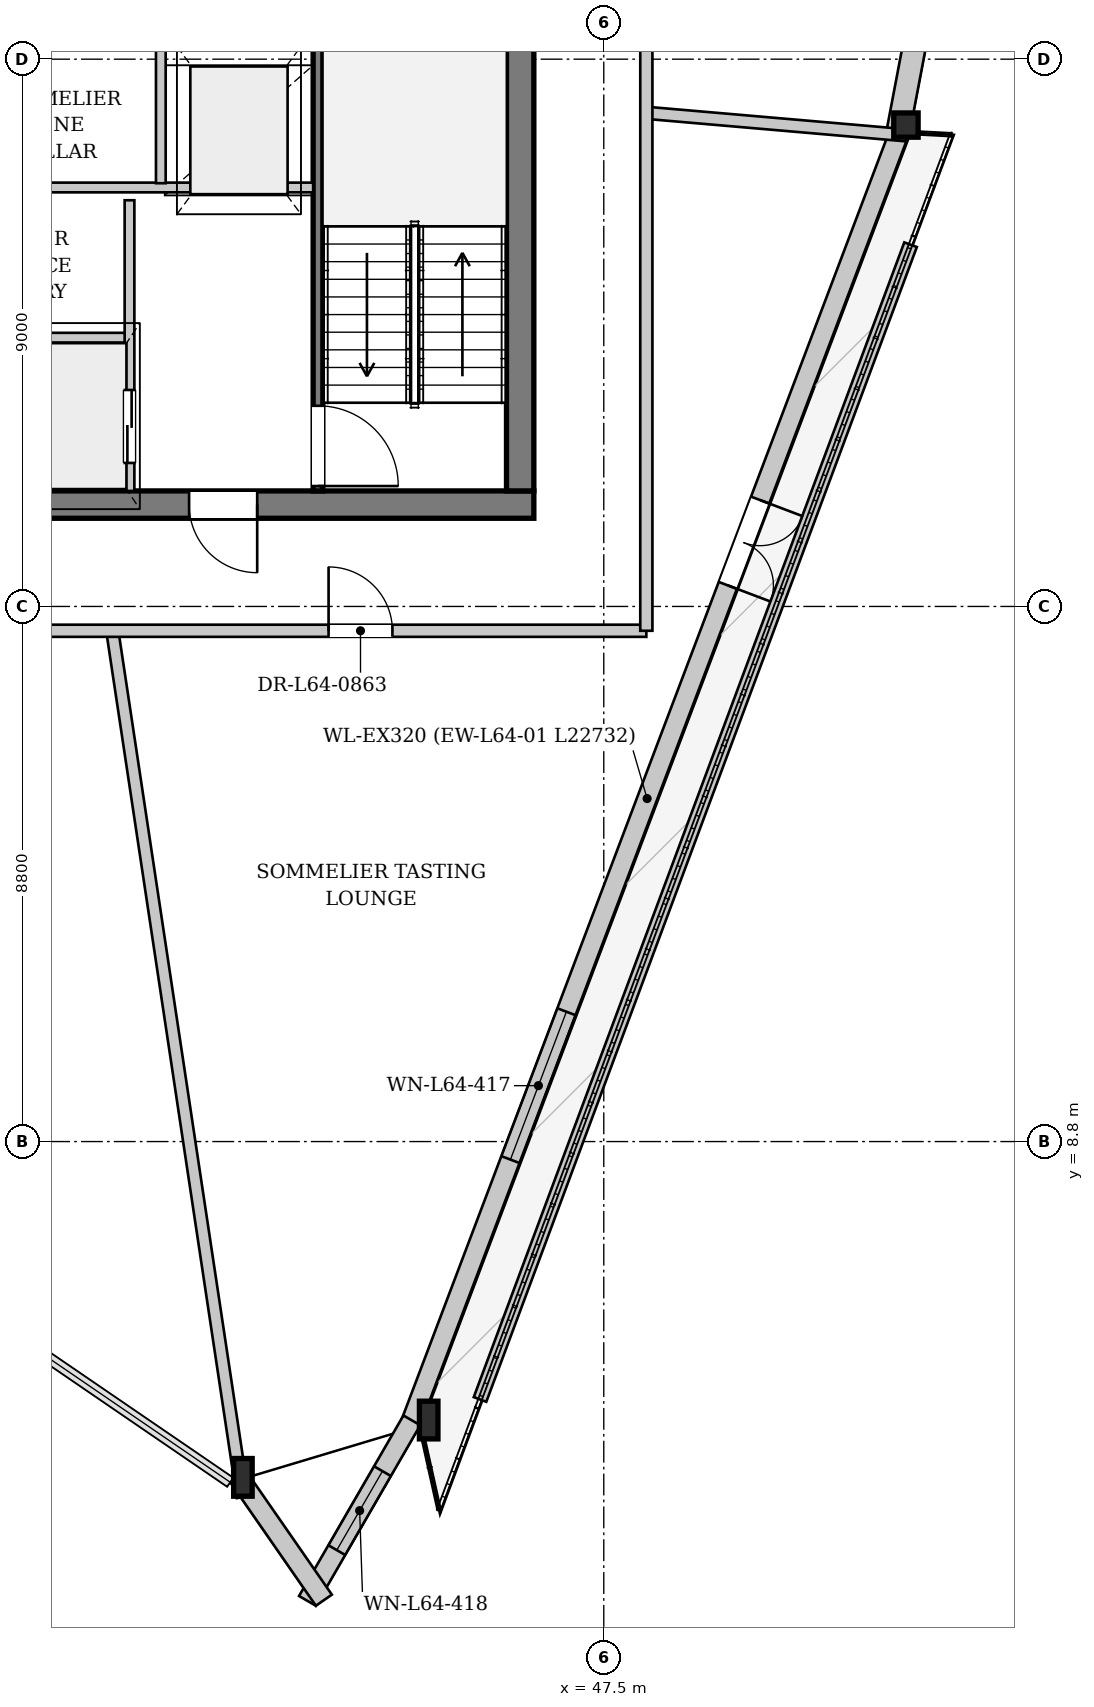
"""IFC4 building model, lengths in metres.
Left out: names, types, materials, properties, quantities, classifications, styles, units other than length and angle.
Written with IfcOpenShell. Run it as: python <this file> out.ifc"""

import sys

from ifc_helpers import new_model, si_unit, direction, frame, frame_2d, origin, origin_2d, place, context, subcontext, project, spatial, rectangle, i_section, extrude, source, transform, mapped, element, fill, save


model = new_model("IFC4")
c1 = context("Model", 3, precision=1e-05, world=origin(), true_north=direction((0.0, 1.0)))
c2 = subcontext(c1, "Body", "Model", "MODEL_VIEW")
j1 = project(units=[si_unit("LENGTHUNIT", "METRE"), si_unit("PLANEANGLEUNIT", "RADIAN")], contexts=[c1])
p1 = place(None, origin())
s1 = spatial("IfcSite", under=j1, at=p1, CompositionType="ELEMENT")
p2 = place(p1, origin())
s2 = spatial("IfcBuilding", under=s1, at=p2, CompositionType="ELEMENT")
p3 = place(p2, frame((0.0, 0.0, 241.7)))
s3 = spatial("IfcBuildingStorey", under=s2, at=p3, CompositionType="ELEMENT", Elevation=241.7)
m1 = source(origin(), c2, "Body", "SweptSolid", [
    extrude(i_section(OverallWidth=0.305, OverallDepth=0.62, WebThickness=0.021, FlangeThickness=0.04, at=origin_2d()), origin(), (0.0, 0.0, 1.0), 3.464),
])
p4 = place(p3, frame((41.357, 3.198, 0.0), z_axis=(0.120378309465, 0.046445729472, 0.991640991904), x_axis=(-0.359967164557, 0.932964972783, 0.0)))
e1 = element("IfcColumn", 1, at=p4, inside=s3, PredefinedType="COLUMN", context=c2, shape_type="MappedRepresentation", body=[
    mapped(m1, transform((0.0, 0.0, 0.0), x_axis=(1.0, 0.0, 0.0), y_axis=(0.0, 1.0, 0.0), z_axis=(0.0, 0.0, 1.0), scale=1.0)),
])
m2 = source(origin(), c2, "Body", "SweptSolid", [
    extrude(i_section(OverallWidth=0.305, OverallDepth=0.62, WebThickness=0.021, FlangeThickness=0.04, at=origin_2d()), origin(), (0.0, 0.0, 1.0), 3.45),
])
p5 = place(p3, frame((44.482, 4.135, 0.0), z_axis=(0.080168448244, 0.049318100994, 0.99556051791), x_axis=(-0.523971590103, 0.851735741157, 0.0)))
e2 = element("IfcColumn", 2, at=p5, inside=s3, PredefinedType="COLUMN", context=c2, shape_type="MappedRepresentation", body=[
    mapped(m2, transform((0.0, 0.0, 0.0), x_axis=(1.0, 0.0, 0.0), y_axis=(0.0, 1.0, 0.0), z_axis=(0.0, 0.0, 1.0), scale=1.0)),
])
m3 = source(origin(), c2, "Body", "SweptSolid", [
    extrude(i_section(OverallWidth=0.401, OverallDepth=0.399, WebThickness=0.022, FlangeThickness=0.034, at=origin_2d()), origin(), (0.0, 0.0, 1.0), 3.446),
])
p6 = place(p3, frame((52.531, 25.394, 0.0), z_axis=(-0.035848953239, 0.071060276874, 0.996827612781), x_axis=(-0.892819182684, -0.450415260656, 0.0)))
e3 = element("IfcColumn", 3, at=p6, inside=s3, PredefinedType="COLUMN", context=c2, shape_type="MappedRepresentation", body=[
    mapped(m3, transform((0.0, 0.0, 0.0), x_axis=(1.0, 0.0, 0.0), y_axis=(0.0, 1.0, 0.0), z_axis=(0.0, 0.0, 1.0), scale=1.0)),
])
p7 = place(p3, frame((52.382, 25.451, 0.0), z_axis=(0.0, 0.0, 1.0), x_axis=(-0.354101826289, -0.935206873702, 0.0)))
e4 = element("IfcWall", 4, at=p7, inside=s3, PredefinedType="SOLIDWALL", context=c2, shape_type="SweptSolid", body=[
    extrude(rectangle(XDim=22.732, YDim=0.32, at=frame_2d((11.366, 0.0))), origin(), (0.0, 0.0, 1.0), 2.872),
])
p8 = place(p7, frame((6.524, 0.0, 0.0)))
e5 = element("IfcOpeningElement", 5, at=p8, cuts=e4, PredefinedType="OPENING", context=c2, shape_type="SweptSolid", body=[
    extrude(rectangle(XDim=1.5, YDim=2.3, at=frame_2d((0.75, 1.15))), frame((0.0, 0.17, 0.0), z_axis=(0.0, -1.0, 0.0), x_axis=(1.0, 0.0, 0.0)), (0.0, 0.0, 1.0), 0.34),
])
p9 = place(p7, frame((15.521, 0.0, 0.402)))
e6 = element("IfcOpeningElement", 6, at=p9, cuts=e4, PredefinedType="OPENING", context=c2, shape_type="SweptSolid", body=[
    extrude(rectangle(XDim=2.6, YDim=2.35, at=frame_2d((1.3, 1.175))), frame((0.0, 0.17, 0.0), z_axis=(0.0, -1.0, 0.0), x_axis=(1.0, 0.0, 0.0)), (0.0, 0.0, 1.0), 0.34),
])
p10 = place(p3, frame((44.344, 4.215, 0.0), z_axis=(0.0, 0.0, 1.0), x_axis=(-0.500640512014, -0.865655288051, 0.0)))
e7 = element("IfcWall", 7, at=p10, inside=s3, PredefinedType="SOLIDWALL", context=c2, shape_type="SweptSolid", body=[
    extrude(rectangle(XDim=3.429, YDim=0.32, at=frame_2d((1.715, 0.0))), origin(), (0.0, 0.0, 1.0), 2.872),
])
p11 = place(p10, frame((0.965, 0.0, 0.452)))
e8 = element("IfcOpeningElement", 8, at=p11, cuts=e7, PredefinedType="OPENING", context=c2, shape_type="SweptSolid", body=[
    extrude(rectangle(XDim=1.5, YDim=2.3, at=frame_2d((0.75, 1.15))), frame((0.0, 0.17, 0.0), z_axis=(0.0, -1.0, 0.0), x_axis=(1.0, 0.0, 0.0)), (0.0, 0.0, 1.0), 0.34),
])
p12 = place(p3, frame((42.896, 1.258, 0.0), z_axis=(0.0, 0.0, 1.0), x_axis=(-0.569903262384, 0.821711793467, 0.0)))
e9 = element("IfcWall", 9, at=p12, inside=s3, PredefinedType="SOLIDWALL", context=c2, shape_type="SweptSolid", body=[
    extrude(rectangle(XDim=2.471, YDim=0.32, at=frame_2d((1.236, 0.0))), origin(), (0.0, 0.0, 1.0), 2.872),
])
p13 = place(p3, frame((56.589, 47.761, 0.0), z_axis=(0.0, 0.0, 1.0), x_axis=(-0.186738493237, -0.982409657497, 0.0)))
e10 = element("IfcWall", 10, at=p13, inside=s3, PredefinedType="SOLIDWALL", context=c2, shape_type="SweptSolid", body=[
    extrude(rectangle(XDim=22.732, YDim=0.38, at=frame_2d((11.366, 0.0))), origin(), (0.0, 0.0, 1.0), 2.872),
])
p14 = place(p13, frame((5.265, 0.0, 0.502)))
e11 = element("IfcOpeningElement", 11, at=p14, cuts=e10, PredefinedType="OPENING", context=c2, shape_type="SweptSolid", body=[
    extrude(rectangle(XDim=2.2, YDim=2.25, at=frame_2d((1.1, 1.125))), frame((0.0, 0.2, 0.0), z_axis=(0.0, -1.0, 0.0), x_axis=(1.0, 0.0, 0.0)), (0.0, 0.0, 1.0), 0.4),
])
p15 = place(p13, frame((15.267, 0.0, 0.502)))
e12 = element("IfcOpeningElement", 12, at=p15, cuts=e10, PredefinedType="OPENING", context=c2, shape_type="SweptSolid", body=[
    extrude(rectangle(XDim=2.2, YDim=2.25, at=frame_2d((1.1, 1.125))), frame((0.0, 0.2, 0.0), z_axis=(0.0, -1.0, 0.0), x_axis=(1.0, 0.0, 0.0)), (0.0, 0.0, 1.0), 0.4),
])
p16 = place(p3, frame((45.465, 4.559, 0.0), z_axis=(0.0, 0.0, 1.0), x_axis=(0.349367033566, 0.93698595286, 0.0)))
e13 = element("IfcWall", 13, at=p16, inside=s3, PredefinedType="PARAPET", context=c2, shape_type="SweptSolid", body=[
    extrude(rectangle(XDim=20.267, YDim=0.22, at=frame_2d((10.133, 0.0))), origin(), (0.0, 0.0, 1.0), 0.3),
])
p17 = place(p3, frame((46.35, 19.275, 0.0), z_axis=(0.0, 0.0, 1.0), x_axis=(-1.0, 0.0, 0.0)))
e14 = element("IfcWall", 14, at=p17, inside=s3, PredefinedType="SHEAR", context=c2, shape_type="SweptSolid", body=[
    extrude(rectangle(XDim=16.7, YDim=0.45, at=frame_2d((8.35, 0.0))), origin(), (0.0, 0.0, 1.0), 3.38),
])
p18 = place(p17, frame((4.55, 0.0, 0.0)))
e15 = element("IfcOpeningElement", 15, at=p18, cuts=e14, PredefinedType="OPENING", context=c2, shape_type="SweptSolid", body=[
    extrude(rectangle(XDim=1.12, YDim=2.25, at=frame_2d((0.56, 1.125))), frame((0.0, 0.235, 0.0), z_axis=(0.0, -1.0, 0.0), x_axis=(1.0, 0.0, 0.0)), (0.0, 0.0, 1.0), 0.47),
])
p19 = place(p17, frame((11.05, 0.0, 0.0)))
e16 = element("IfcOpeningElement", 16, at=p19, cuts=e14, PredefinedType="OPENING", context=c2, shape_type="SweptSolid", body=[
    extrude(rectangle(XDim=1.12, YDim=2.25, at=frame_2d((0.56, 1.125))), frame((0.0, 0.235, 0.0), z_axis=(0.0, -1.0, 0.0), x_axis=(1.0, 0.0, 0.0)), (0.0, 0.0, 1.0), 0.47),
])
p20 = place(p3, frame((46.125, 33.7, 0.0), z_axis=(0.0, 0.0, 1.0), x_axis=(0.0, -1.0, 0.0)))
e17 = element("IfcWall", 17, at=p20, inside=s3, PredefinedType="SHEAR", context=c2, shape_type="SweptSolid", body=[
    extrude(rectangle(XDim=14.2, YDim=0.45, at=frame_2d((7.1, 0.0))), origin(), (0.0, 0.0, 1.0), 3.38),
])
p21 = place(p20, frame((5.18, 0.0, 0.0)))
e18 = element("IfcOpeningElement", 18, at=p21, cuts=e17, PredefinedType="OPENING", context=c2, shape_type="SweptSolid", body=[
    extrude(rectangle(XDim=1.6, YDim=2.2, at=frame_2d((0.8, 1.1))), frame((0.0, 0.235, 0.0), z_axis=(0.0, -1.0, 0.0), x_axis=(1.0, 0.0, 0.0)), (0.0, 0.0, 1.0), 0.47),
])
p22 = place(p20, frame((2.05, 0.0, 0.0)))
e19 = element("IfcOpeningElement", 19, at=p22, cuts=e17, PredefinedType="OPENING", context=c2, shape_type="SweptSolid", body=[
    extrude(rectangle(XDim=0.95, YDim=2.1, at=frame_2d((0.475, 1.05))), frame((0.0, 0.235, 0.0), z_axis=(0.0, -1.0, 0.0), x_axis=(1.0, 0.0, 0.0)), (0.0, 0.0, 1.0), 0.47),
])
p23 = place(p3, frame((42.8, 26.96, 0.0), z_axis=(0.0, 0.0, 1.0), x_axis=(0.0, -1.0, 0.0)))
e20 = element("IfcWall", 20, at=p23, inside=s3, PredefinedType="PARTITIONING", context=c2, shape_type="SweptSolid", body=[
    extrude(rectangle(XDim=7.46, YDim=0.16, at=frame_2d((3.73, 0.0))), origin(), (0.0, 0.0, 1.0), 3.38),
])
p24 = place(p23, frame((6.06, 0.0, 0.0)))
e21 = element("IfcOpeningElement", 21, at=p24, cuts=e20, PredefinedType="OPENING", context=c2, shape_type="SweptSolid", body=[
    extrude(rectangle(XDim=1.32, YDim=2.2, at=frame_2d((0.66, 1.1))), frame((0.0, 0.09, 0.0), z_axis=(0.0, -1.0, 0.0), x_axis=(1.0, 0.0, 0.0)), (0.0, 0.0, 1.0), 0.18),
])
p25 = place(p3, frame((39.7, 24.28, 0.0), z_axis=(0.0, 0.0, 1.0), x_axis=(0.0, -1.0, 0.0)))
e22 = element("IfcWall", 22, at=p25, inside=s3, PredefinedType="PARTITIONING", context=c2, shape_type="SweptSolid", body=[
    extrude(rectangle(XDim=4.78, YDim=0.16, at=frame_2d((2.39, 0.0))), origin(), (0.0, 0.0, 1.0), 3.38),
])
p26 = place(p25, frame((3.12, 0.0, 0.0)))
e23 = element("IfcOpeningElement", 23, at=p26, cuts=e22, PredefinedType="OPENING", context=c2, shape_type="SweptSolid", body=[
    extrude(rectangle(XDim=1.2, YDim=2.2, at=frame_2d((0.6, 1.1))), frame((0.0, 0.09, 0.0), z_axis=(0.0, -1.0, 0.0), x_axis=(1.0, 0.0, 0.0)), (0.0, 0.0, 1.0), 0.18),
])
p27 = place(p3, frame((36.38, 22.02, 0.0), z_axis=(0.0, 0.0, 1.0), x_axis=(1.0, 0.0, 0.0)))
e24 = element("IfcWall", 24, at=p27, inside=s3, PredefinedType="PARTITIONING", context=c2, shape_type="SweptSolid", body=[
    extrude(rectangle(XDim=3.24, YDim=0.16, at=frame_2d((1.62, 0.0))), origin(), (0.0, 0.0, 1.0), 3.38),
])
p28 = place(p3, frame((33.28, 24.49, 0.0), z_axis=(0.0, 0.0, 1.0), x_axis=(1.0, 0.0, 0.0)))
e25 = element("IfcWall", 25, at=p28, inside=s3, PredefinedType="PARTITIONING", context=c2, shape_type="SweptSolid", body=[
    extrude(rectangle(XDim=9.44, YDim=0.16, at=frame_2d((4.72, 0.0))), origin(), (0.0, 0.0, 1.0), 3.38),
])
p29 = place(p3, frame((40.215, 24.56, 0.0), z_axis=(0.0, 0.0, 1.0), x_axis=(0.0, 1.0, 0.0)))
e26 = element("IfcWall", 26, at=p29, inside=s3, PredefinedType="PARTITIONING", context=c2, shape_type="SweptSolid", body=[
    extrude(rectangle(XDim=2.31, YDim=0.16, at=frame_2d((1.155, 0.0))), origin(), (0.0, 0.0, 1.0), 3.38),
])
p30 = place(p3, frame((39.417, 17.2, 0.0), z_axis=(0.0, 0.0, 1.0), x_axis=(0.149026402879, -0.988833217102, 0.0)))
e27 = element("IfcWall", 27, at=p30, inside=s3, PredefinedType="PARTITIONING", context=c2, shape_type="SweptSolid", body=[
    extrude(rectangle(XDim=14.41, YDim=0.2, at=frame_2d((7.205, 0.0))), origin(), (0.0, 0.0, 1.0), 3.38),
])
p31 = place(p3, frame((48.2, 25.718, 0.0), z_axis=(0.0, 0.0, 1.0), x_axis=(0.996279919432, -0.086176111174, 0.0)))
e28 = element("IfcWall", 28, at=p31, inside=s3, PredefinedType="PARTITIONING", context=c2, shape_type="SweptSolid", body=[
    extrude(rectangle(XDim=4.298, YDim=0.2, at=frame_2d((2.149, 0.0))), origin(), (0.0, 0.0, 1.0), 2.915),
])
p32 = place(p3, frame((27.8, 17.2, 0.0), z_axis=(0.0, 0.0, 1.0), x_axis=(1.0, 0.0, 0.0)))
e29 = element("IfcWall", 29, at=p32, inside=s3, PredefinedType="PARTITIONING", context=c2, shape_type="SweptSolid", body=[
    extrude(rectangle(XDim=20.4, YDim=0.2, at=frame_2d((10.2, 0.0))), origin(), (0.0, 0.0, 1.0), 3.38),
])
p33 = place(p32, frame((4.231, 0.0, 0.0)))
e30 = element("IfcOpeningElement", 30, at=p33, cuts=e29, PredefinedType="OPENING", context=c2, shape_type="SweptSolid", body=[
    extrude(rectangle(XDim=1.05, YDim=2.2, at=frame_2d((0.525, 1.1))), frame((0.0, 0.11, 0.0), z_axis=(0.0, -1.0, 0.0), x_axis=(1.0, 0.0, 0.0)), (0.0, 0.0, 1.0), 0.22),
])
p34 = place(p32, frame((15.174, 0.0, 0.0)))
e31 = element("IfcOpeningElement", 31, at=p34, cuts=e29, PredefinedType="OPENING", context=c2, shape_type="SweptSolid", body=[
    extrude(rectangle(XDim=1.05, YDim=2.2, at=frame_2d((0.525, 1.1))), frame((0.0, 0.11, 0.0), z_axis=(0.0, -1.0, 0.0), x_axis=(1.0, 0.0, 0.0)), (0.0, 0.0, 1.0), 0.22),
])
p35 = place(p3, frame((48.2, 17.2, 0.0), z_axis=(0.0, 0.0, 1.0), x_axis=(0.0, 1.0, 0.0)))
e32 = element("IfcWall", 32, at=p35, inside=s3, PredefinedType="PARTITIONING", context=c2, shape_type="SweptSolid", body=[
    extrude(rectangle(XDim=18.8, YDim=0.2, at=frame_2d((9.4, 0.0))), origin(), (0.0, 0.0, 1.0), 3.005),
])
m4 = source(origin(), c2, "Body", "SweptSolid", [
    extrude(rectangle(XDim=1.5, YDim=2.3, at=frame_2d((0.75, 1.15))), frame((0.0, 0.025, 0.0), z_axis=(0.0, -1.0, 0.0), x_axis=(1.0, 0.0, 0.0)), (0.0, 0.0, 1.0), 0.05),
])
p36 = place(p8, origin())
e33 = element("IfcDoor", 33, at=p36, inside=s3, OperationType="DOUBLE_DOOR_SINGLE_SWING", PredefinedType="DOOR", context=c2, shape_type="MappedRepresentation", body=[
    mapped(m4, transform((0.0, 0.0, 0.0), x_axis=(1.0, 0.0, 0.0), y_axis=(0.0, 1.0, 0.0), z_axis=(0.0, 0.0, 1.0), scale=1.0)),
])
fill(e5, e33)
m5 = source(origin(), c2, "Body", "SweptSolid", [
    extrude(rectangle(XDim=2.6, YDim=2.35, at=frame_2d((1.3, 1.175))), frame((0.0, 0.03, 0.0), z_axis=(0.0, -1.0, 0.0), x_axis=(1.0, 0.0, 0.0)), (0.0, 0.0, 1.0), 0.06),
])
p37 = place(p9, origin())
e34 = element("IfcWindow", 34, at=p37, inside=s3, PartitioningType="SINGLE_PANEL", PredefinedType="WINDOW", context=c2, shape_type="MappedRepresentation", body=[
    mapped(m5, transform((0.0, 0.0, 0.0), x_axis=(1.0, 0.0, 0.0), y_axis=(0.0, 1.0, 0.0), z_axis=(0.0, 0.0, 1.0), scale=1.0)),
])
fill(e6, e34)
m6 = source(origin(), c2, "Body", "SweptSolid", [
    extrude(rectangle(XDim=1.5, YDim=2.3, at=frame_2d((0.75, 1.15))), frame((0.0, 0.03, 0.0), z_axis=(0.0, -1.0, 0.0), x_axis=(1.0, 0.0, 0.0)), (0.0, 0.0, 1.0), 0.06),
])
p38 = place(p11, origin())
e35 = element("IfcWindow", 35, at=p38, inside=s3, PartitioningType="SINGLE_PANEL", PredefinedType="WINDOW", context=c2, shape_type="MappedRepresentation", body=[
    mapped(m6, transform((0.0, 0.0, 0.0), x_axis=(1.0, 0.0, 0.0), y_axis=(0.0, 1.0, 0.0), z_axis=(0.0, 0.0, 1.0), scale=1.0)),
])
fill(e8, e35)
m7 = source(origin(), c2, "Body", "SweptSolid", [
    extrude(rectangle(XDim=1.12, YDim=2.25, at=frame_2d((0.56, 1.125))), frame((0.0, 0.025, 0.0), z_axis=(0.0, -1.0, 0.0), x_axis=(1.0, 0.0, 0.0)), (0.0, 0.0, 1.0), 0.05),
])
p39 = place(p18, origin())
e36 = element("IfcDoor", 36, at=p39, inside=s3, OperationType="SINGLE_SWING_LEFT", PredefinedType="DOOR", context=c2, shape_type="MappedRepresentation", body=[
    mapped(m7, transform((0.0, 0.0, 0.0), x_axis=(1.0, 0.0, 0.0), y_axis=(0.0, 1.0, 0.0), z_axis=(0.0, 0.0, 1.0), scale=1.0)),
])
fill(e15, e36)
m8 = source(origin(), c2, "Body", "SweptSolid", [
    extrude(rectangle(XDim=1.32, YDim=2.2, at=frame_2d((0.66, 1.1))), frame((0.0, 0.025, 0.0), z_axis=(0.0, -1.0, 0.0), x_axis=(1.0, 0.0, 0.0)), (0.0, 0.0, 1.0), 0.05),
])
p40 = place(p24, origin())
e37 = element("IfcDoor", 37, at=p40, inside=s3, OperationType="SINGLE_SWING_RIGHT", PredefinedType="DOOR", context=c2, shape_type="MappedRepresentation", body=[
    mapped(m8, transform((0.0, 0.0, 0.0), x_axis=(1.0, 0.0, 0.0), y_axis=(0.0, 1.0, 0.0), z_axis=(0.0, 0.0, 1.0), scale=1.0)),
])
fill(e21, e37)
m9 = source(origin(), c2, "Body", "SweptSolid", [
    extrude(rectangle(XDim=1.2, YDim=2.2, at=frame_2d((0.6, 1.1))), frame((0.0, 0.025, 0.0), z_axis=(0.0, -1.0, 0.0), x_axis=(1.0, 0.0, 0.0)), (0.0, 0.0, 1.0), 0.05),
])
p41 = place(p26, origin())
e38 = element("IfcDoor", 38, at=p41, inside=s3, OperationType="DOUBLE_DOOR_SLIDING", PredefinedType="DOOR", context=c2, shape_type="MappedRepresentation", body=[
    mapped(m9, transform((0.0, 0.0, 0.0), x_axis=(1.0, 0.0, 0.0), y_axis=(0.0, 1.0, 0.0), z_axis=(0.0, 0.0, 1.0), scale=1.0)),
])
fill(e23, e38)
m10 = source(origin(), c2, "Body", "SweptSolid", [
    extrude(rectangle(XDim=1.05, YDim=2.2, at=frame_2d((0.525, 1.1))), frame((0.0, 0.025, 0.0), z_axis=(0.0, -1.0, 0.0), x_axis=(1.0, 0.0, 0.0)), (0.0, 0.0, 1.0), 0.05),
])
p42 = place(p34, origin())
e39 = element("IfcDoor", 39, at=p42, inside=s3, OperationType="SINGLE_SWING_LEFT", PredefinedType="DOOR", context=c2, shape_type="MappedRepresentation", body=[
    mapped(m10, transform((0.0, 0.0, 0.0), x_axis=(1.0, 0.0, 0.0), y_axis=(0.0, 1.0, 0.0), z_axis=(0.0, 0.0, 1.0), scale=1.0)),
])
fill(e31, e39)
save(model, sys.argv[1])
